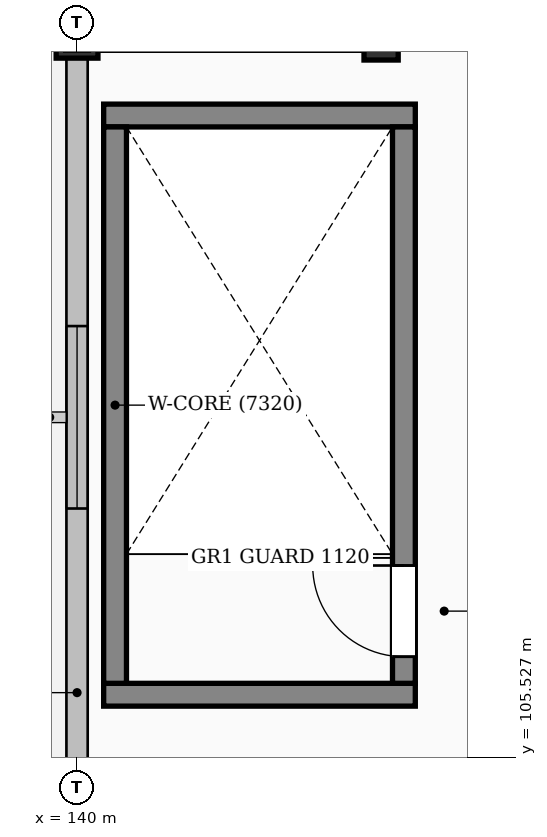
"""IFC4 building model, lengths in metres.
Left out: names, types, materials, properties, quantities, classifications, styles, units other than length and angle.
Written with IfcOpenShell. Run it as: python <this file> out.ifc"""

import sys

from ifc_helpers import new_model, si_unit, direction, frame, frame_2d, origin, origin_2d, place, context, subcontext, project, spatial, rectangle, extrude, element, fill, save


model = new_model("IFC4")
c1 = context("Model", 3, precision=1e-05, world=origin(), true_north=direction((0.0, 1.0)))
c2 = subcontext(c1, "Body", "Model", "MODEL_VIEW")
j1 = project(units=[si_unit("LENGTHUNIT", "METRE"), si_unit("PLANEANGLEUNIT", "RADIAN")], contexts=[c1])
p1 = place(None, origin())
s1 = spatial("IfcSite", under=j1, at=p1, CompositionType="ELEMENT")
p2 = place(p1, origin())
s2 = spatial("IfcBuilding", under=s1, at=p2, CompositionType="ELEMENT")
p3 = place(p2, frame((0.0, 0.0, 22.8)))
s3 = spatial("IfcBuildingStorey", under=s2, at=p3, CompositionType="ELEMENT", Elevation=22.8)
p4 = place(p3, frame((140.0, 115.0, 0.0), z_axis=(0.0, 0.0, 1.0), x_axis=(1.0, 0.0, 0.0)))
e1 = element("IfcColumn", 1, at=p4, inside=s3, PredefinedType="COLUMN", context=c2, shape_type="SweptSolid", body=[
    extrude(rectangle(XDim=0.55, YDim=0.55, at=origin_2d()), origin(), (0.0, 0.0, 1.0), 4.5),
])
p5 = place(p3, frame((144.0, 115.0, 0.0), z_axis=(0.0, 0.0, 1.0), x_axis=(1.0, 0.0, 0.0)))
e2 = element("IfcColumn", 2, at=p5, inside=s3, PredefinedType="PILASTER", context=c2, shape_type="SweptSolid", body=[
    extrude(rectangle(XDim=0.45, YDim=0.6, at=origin_2d()), origin(), (0.0, 0.0, 1.0), 4.5),
])
p6 = place(p3, frame((140.0, 105.275, 0.0), z_axis=(0.0, 0.0, 1.0), x_axis=(0.0, 1.0, 0.0)))
e3 = element("IfcWall", 3, at=p6, inside=s3, PredefinedType="SOLIDWALL", context=c2, shape_type="SweptSolid", body=[
    extrude(rectangle(XDim=9.45, YDim=0.28, at=frame_2d((4.725, 0.0))), origin(), (0.0, 0.0, 1.0), 3.585),
])
p7 = place(p6, frame((3.525, 0.0, 0.95)))
e4 = element("IfcOpeningElement", 4, at=p7, cuts=e3, PredefinedType="OPENING", context=c2, shape_type="SweptSolid", body=[
    extrude(rectangle(XDim=2.4, YDim=1.2, at=frame_2d((1.2, 0.6))), frame((0.0, 0.15, 0.0), z_axis=(0.0, -1.0, 0.0), x_axis=(1.0, 0.0, 0.0)), (0.0, 0.0, 1.0), 0.3),
])
for number, where, z_axis, x_axis in (
    (5, (140.35, 106.35, 0.0), (0.0, 0.0, 1.0), (1.0, 0.0, 0.0)),
    (6, (144.45, 113.97, 0.0), (0.0, 0.0, 1.0), (-1.0, 0.0, 0.0)),
):
    element("IfcWall", number, at=place(p3, frame(where, z_axis=z_axis, x_axis=x_axis)), inside=s3, PredefinedType="SHEAR", context=c2, shape_type="SweptSolid", body=[
        extrude(rectangle(XDim=4.1, YDim=0.3, at=frame_2d((2.05, 0.0))), origin(), (0.0, 0.0, 1.0), 4.25),
    ])
p8 = place(p3, frame((140.5, 106.5, 0.0), z_axis=(0.0, 0.0, 1.0), x_axis=(0.0, 1.0, 0.0)))
e7 = element("IfcWall", 7, at=p8, inside=s3, PredefinedType="SHEAR", context=c2, shape_type="SweptSolid", body=[
    extrude(rectangle(XDim=7.32, YDim=0.3, at=frame_2d((3.66, 0.0))), origin(), (0.0, 0.0, 1.0), 4.25),
])
p9 = place(p3, frame((144.3, 106.5, 0.0), z_axis=(0.0, 0.0, 1.0), x_axis=(0.0, 1.0, 0.0)))
e8 = element("IfcWall", 8, at=p9, inside=s3, PredefinedType="SHEAR", context=c2, shape_type="SweptSolid", body=[
    extrude(rectangle(XDim=7.32, YDim=0.3, at=frame_2d((3.66, 0.0))), origin(), (0.0, 0.0, 1.0), 4.25),
])
p10 = place(p9, frame((0.35, 0.0, 0.0)))
e9 = element("IfcOpeningElement", 9, at=p10, cuts=e8, PredefinedType="OPENING", context=c2, shape_type="SweptSolid", body=[
    extrude(rectangle(XDim=1.2, YDim=2.15, at=frame_2d((0.6, 1.075))), frame((0.0, 0.16, 0.0), z_axis=(0.0, -1.0, 0.0), x_axis=(1.0, 0.0, 0.0)), (0.0, 0.0, 1.0), 0.32),
])
p11 = place(p7, origin())
e10 = element("IfcWindow", 10, at=p11, inside=s3, PartitioningType="TRIPLE_PANEL_HORIZONTAL", PredefinedType="WINDOW", context=c2, shape_type="SweptSolid", body=[
    extrude(rectangle(XDim=2.4, YDim=1.2, at=frame_2d((1.2, 0.6))), frame((0.0, 0.03, 0.0), z_axis=(0.0, -1.0, 0.0), x_axis=(1.0, 0.0, 0.0)), (0.0, 0.0, 1.0), 0.06),
])
fill(e4, e10)
p12 = place(p10, origin())
e11 = element("IfcDoor", 11, at=p12, inside=s3, OperationType="SINGLE_SWING_RIGHT", PredefinedType="DOOR", context=c2, shape_type="SweptSolid", body=[
    extrude(rectangle(XDim=1.2, YDim=2.15, at=frame_2d((0.6, 1.075))), frame((0.0, 0.025, 0.0), z_axis=(0.0, -1.0, 0.0), x_axis=(1.0, 0.0, 0.0)), (0.0, 0.0, 1.0), 0.05),
])
fill(e9, e11)
save(model, sys.argv[1])
